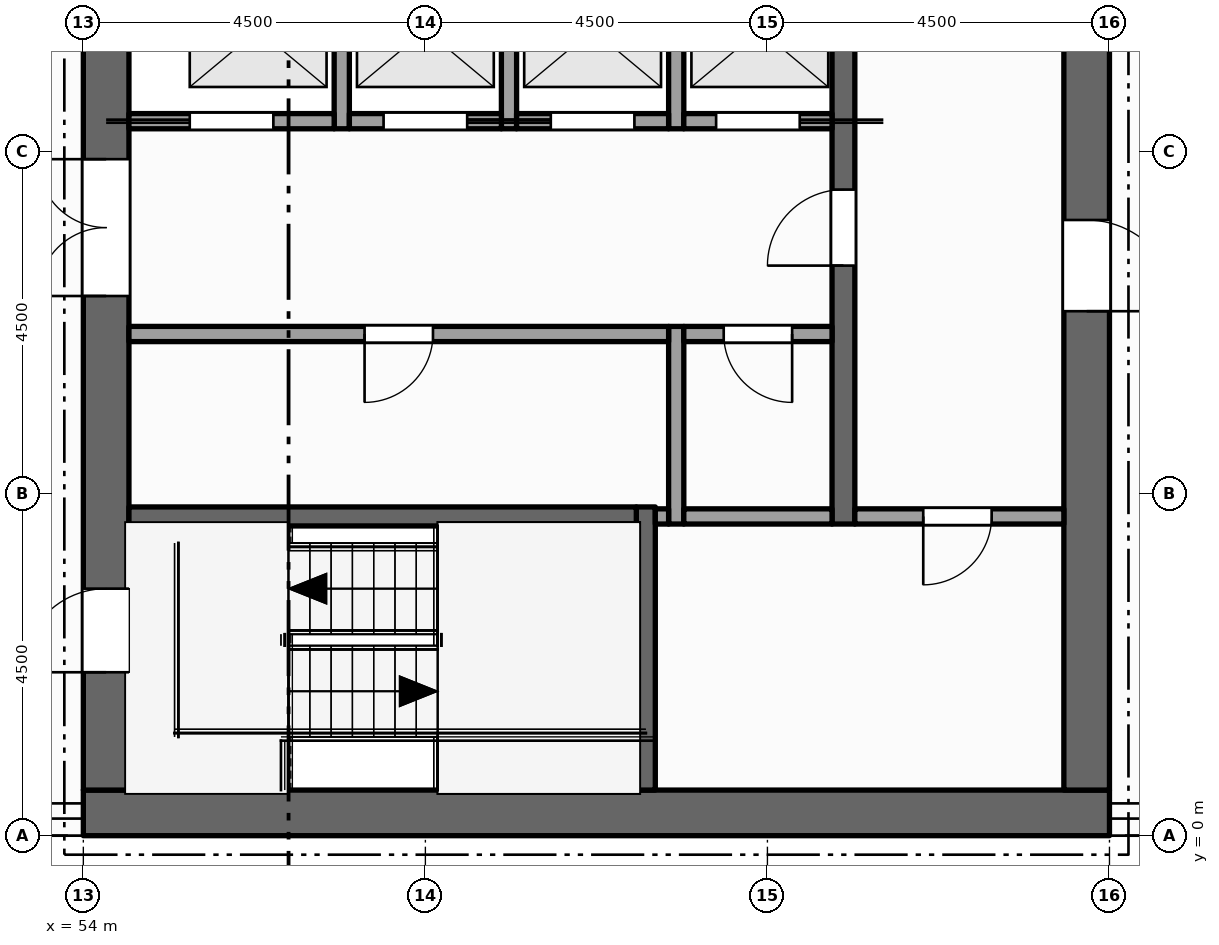
"""IFC4 building model, lengths in metres.
Left out: names, types, materials, properties, quantities, classifications, styles, units other than length and angle.
Written with IfcOpenShell. Run it as: python <this file> out.ifc"""

import sys

from ifc_helpers import new_model, si_unit, direction, frame, frame_2d, origin, place, context, subcontext, project, spatial, rectangle, extrude, element, fill, save


model = new_model("IFC4")
c1 = context("Model", 3, precision=1e-05, world=origin(), true_north=direction((0.0, 1.0)))
c2 = subcontext(c1, "Body", "Model", "MODEL_VIEW")
j1 = project(units=[si_unit("LENGTHUNIT", "METRE"), si_unit("PLANEANGLEUNIT", "RADIAN")], contexts=[c1])
p1 = place(None, origin())
s1 = spatial("IfcSite", under=j1, at=p1, CompositionType="ELEMENT")
p2 = place(p1, origin())
s2 = spatial("IfcBuilding", under=s1, at=p2, CompositionType="ELEMENT")
p3 = place(p2, frame((0.0, 0.0, 345.5)))
s3 = spatial("IfcBuildingStorey", under=s2, at=p3, CompositionType="ELEMENT", Elevation=345.5)
p4 = place(p3, frame((67.5, 0.3, -0.15), z_axis=(0.0, 0.0, 1.0), x_axis=(-1.0, 0.0, 0.0)))
e1 = element("IfcWall", 1, at=p4, inside=s3, PredefinedType="SHEAR", context=c2, shape_type="SweptSolid", body=[
    extrude(rectangle(XDim=13.5, YDim=0.6, at=frame_2d((6.75, 0.0))), origin(), (0.0, 0.0, 1.0), 5.0),
])
p5 = place(p3, frame((54.3, 0.6, -0.15), z_axis=(0.0, 0.0, 1.0), x_axis=(0.0, 1.0, 0.0)))
e2 = element("IfcWall", 2, at=p5, inside=s3, PredefinedType="SHEAR", context=c2, shape_type="SweptSolid", body=[
    extrude(rectangle(XDim=21.3, YDim=0.6, at=frame_2d((10.65, 0.0))), origin(), (0.0, 0.0, 1.0), 5.0),
])
p6 = place(p5, frame((6.5, 0.0, 0.15)))
e3 = element("IfcOpeningElement", 3, at=p6, cuts=e2, PredefinedType="OPENING", context=c2, shape_type="SweptSolid", body=[
    extrude(rectangle(XDim=1.8, YDim=2.1, at=frame_2d((0.9, 1.05))), frame((0.0, 0.31, 0.0), z_axis=(0.0, -1.0, 0.0), x_axis=(1.0, 0.0, 0.0)), (0.0, 0.0, 1.0), 0.62),
])
p7 = place(p5, frame((12.55, 0.0, 0.15)))
e4 = element("IfcOpeningElement", 4, at=p7, cuts=e2, PredefinedType="OPENING", context=c2, shape_type="SweptSolid", body=[
    extrude(rectangle(XDim=1.1, YDim=2.1, at=frame_2d((0.55, 1.05))), frame((0.0, 0.31, 0.0), z_axis=(0.0, -1.0, 0.0), x_axis=(1.0, 0.0, 0.0)), (0.0, 0.0, 1.0), 0.62),
])
p8 = place(p5, frame((1.55, 0.0, 0.15)))
e5 = element("IfcOpeningElement", 5, at=p8, cuts=e2, PredefinedType="OPENING", context=c2, shape_type="SweptSolid", body=[
    extrude(rectangle(XDim=1.1, YDim=2.1, at=frame_2d((0.55, 1.05))), frame((0.0, 0.31, 0.0), z_axis=(0.0, -1.0, 0.0), x_axis=(1.0, 0.0, 0.0)), (0.0, 0.0, 1.0), 0.62),
])
p9 = place(p5, frame((18.75, 0.0, 0.15)))
e6 = element("IfcOpeningElement", 6, at=p9, cuts=e2, PredefinedType="OPENING", context=c2, shape_type="SweptSolid", body=[
    extrude(rectangle(XDim=1.1, YDim=2.1, at=frame_2d((0.55, 1.05))), frame((0.0, 0.31, 0.0), z_axis=(0.0, -1.0, 0.0), x_axis=(1.0, 0.0, 0.0)), (0.0, 0.0, 1.0), 0.62),
])
p10 = place(p3, frame((67.2, 0.6, -0.15), z_axis=(0.0, 0.0, 1.0), x_axis=(0.0, 1.0, 0.0)))
e7 = element("IfcWall", 7, at=p10, inside=s3, PredefinedType="SHEAR", context=c2, shape_type="SweptSolid", body=[
    extrude(rectangle(XDim=21.3, YDim=0.6, at=frame_2d((10.65, 0.0))), origin(), (0.0, 0.0, 1.0), 5.0),
])
p11 = place(p10, frame((6.3, 0.0, 0.15)))
e8 = element("IfcOpeningElement", 8, at=p11, cuts=e7, PredefinedType="OPENING", context=c2, shape_type="SweptSolid", body=[
    extrude(rectangle(XDim=1.2, YDim=2.1, at=frame_2d((0.6, 1.05))), frame((0.0, 0.31, 0.0), z_axis=(0.0, -1.0, 0.0), x_axis=(1.0, 0.0, 0.0)), (0.0, 0.0, 1.0), 0.62),
])
p12 = place(p10, frame((12.8, 0.0, 0.15)))
e9 = element("IfcOpeningElement", 9, at=p12, cuts=e7, PredefinedType="OPENING", context=c2, shape_type="SweptSolid", body=[
    extrude(rectangle(XDim=1.2, YDim=2.1, at=frame_2d((0.6, 1.05))), frame((0.0, 0.31, 0.0), z_axis=(0.0, -1.0, 0.0), x_axis=(1.0, 0.0, 0.0)), (0.0, 0.0, 1.0), 0.62),
])
for number, where, z_axis, x_axis in (
    (10, (57.4, 9.3, 0.0), (0.0, 0.0, 1.0), (0.0, 1.0, 0.0)),
    (11, (59.6, 9.3, 0.0), (0.0, 0.0, 1.0), (0.0, 1.0, 0.0)),
):
    element("IfcWall", number, at=place(p3, frame(where, z_axis=z_axis, x_axis=x_axis)), inside=s3, PredefinedType="SOLIDWALL", context=c2, shape_type="SweptSolid", body=[
        extrude(rectangle(XDim=2.6, YDim=0.2, at=frame_2d((1.3, 0.0))), origin(), (0.0, 0.0, 1.0), 4.8),
    ])
p13 = place(p3, frame((61.4, 0.6, 0.0), z_axis=(0.0, 0.0, 1.0), x_axis=(0.0, 1.0, 0.0)))
e12 = element("IfcWall", 12, at=p13, inside=s3, PredefinedType="SHEAR", context=c2, shape_type="SweptSolid", body=[
    extrude(rectangle(XDim=3.725, YDim=0.25, at=frame_2d((1.862, 0.0))), origin(), (0.0, 0.0, 1.0), 4.8),
])
p14 = place(p3, frame((61.8, 4.1, 0.0), z_axis=(0.0, 0.0, 1.0), x_axis=(0.0, 1.0, 0.0)))
e13 = element("IfcWall", 13, at=p14, inside=s3, PredefinedType="PARTITIONING", context=c2, shape_type="SweptSolid", body=[
    extrude(rectangle(XDim=2.6, YDim=0.2, at=frame_2d((1.3, 0.0))), origin(), (0.0, 0.0, 1.0), 4.8),
])
p15 = place(p3, frame((61.8, 9.3, 0.0), z_axis=(0.0, 0.0, 1.0), x_axis=(0.0, 1.0, 0.0)))
e14 = element("IfcWall", 14, at=p15, inside=s3, PredefinedType="SOLIDWALL", context=c2, shape_type="SweptSolid", body=[
    extrude(rectangle(XDim=2.6, YDim=0.2, at=frame_2d((1.3, 0.0))), origin(), (0.0, 0.0, 1.0), 4.8),
])
p16 = place(p3, frame((64.0, 4.1, 0.0), z_axis=(0.0, 0.0, 1.0), x_axis=(0.0, 1.0, 0.0)))
e15 = element("IfcWall", 15, at=p16, inside=s3, PredefinedType="SHEAR", context=c2, shape_type="SweptSolid", body=[
    extrude(rectangle(XDim=14.5, YDim=0.3, at=frame_2d((7.25, 0.0))), origin(), (0.0, 0.0, 1.0), 4.8),
])
p17 = place(p16, frame((3.4, 0.0, 0.0)))
e16 = element("IfcOpeningElement", 16, at=p17, cuts=e15, PredefinedType="OPENING", context=c2, shape_type="SweptSolid", body=[
    extrude(rectangle(XDim=1.0, YDim=2.1, at=frame_2d((0.5, 1.05))), frame((0.0, 0.16, 0.0), z_axis=(0.0, -1.0, 0.0), x_axis=(1.0, 0.0, 0.0)), (0.0, 0.0, 1.0), 0.32),
])
p18 = place(p16, frame((9.1, 0.0, 0.0)))
e17 = element("IfcOpeningElement", 17, at=p18, cuts=e15, PredefinedType="OPENING", context=c2, shape_type="SweptSolid", body=[
    extrude(rectangle(XDim=1.0, YDim=2.1, at=frame_2d((0.5, 1.05))), frame((0.0, 0.16, 0.0), z_axis=(0.0, -1.0, 0.0), x_axis=(1.0, 0.0, 0.0)), (0.0, 0.0, 1.0), 0.32),
])
p19 = place(p3, frame((54.6, 4.2, 0.0), z_axis=(0.0, 0.0, 1.0), x_axis=(1.0, 0.0, 0.0)))
e18 = element("IfcWall", 18, at=p19, inside=s3, PredefinedType="SHEAR", context=c2, shape_type="SweptSolid", body=[
    extrude(rectangle(XDim=6.675, YDim=0.25, at=frame_2d((3.337, 0.0))), origin(), (0.0, 0.0, 1.0), 4.8),
])
p20 = place(p3, frame((61.525, 4.2, 0.0), z_axis=(0.0, 0.0, 1.0), x_axis=(1.0, 0.0, 0.0)))
e19 = element("IfcWall", 19, at=p20, inside=s3, PredefinedType="PARTITIONING", context=c2, shape_type="SweptSolid", body=[
    extrude(rectangle(XDim=0.175, YDim=0.2, at=frame_2d((0.087, 0.0))), origin(), (0.0, 0.0, 1.0), 4.35),
])
p21 = place(p3, frame((61.9, 4.2, 0.0), z_axis=(0.0, 0.0, 1.0), x_axis=(1.0, 0.0, 0.0)))
e20 = element("IfcWall", 20, at=p21, inside=s3, PredefinedType="PARTITIONING", context=c2, shape_type="SweptSolid", body=[
    extrude(rectangle(XDim=1.95, YDim=0.2, at=frame_2d((0.975, 0.0))), origin(), (0.0, 0.0, 1.0), 4.35),
])
p22 = place(p3, frame((64.15, 4.2, 0.0), z_axis=(0.0, 0.0, 1.0), x_axis=(1.0, 0.0, 0.0)))
e21 = element("IfcWall", 21, at=p22, inside=s3, PredefinedType="PARTITIONING", context=c2, shape_type="SweptSolid", body=[
    extrude(rectangle(XDim=2.75, YDim=0.2, at=frame_2d((1.375, 0.0))), origin(), (0.0, 0.0, 1.0), 4.35),
])
p23 = place(p22, frame((0.9, 0.0, 0.0)))
e22 = element("IfcOpeningElement", 22, at=p23, cuts=e21, PredefinedType="OPENING", context=c2, shape_type="SweptSolid", body=[
    extrude(rectangle(XDim=0.9, YDim=2.1, at=frame_2d((0.45, 1.05))), frame((0.0, 0.11, 0.0), z_axis=(0.0, -1.0, 0.0), x_axis=(1.0, 0.0, 0.0)), (0.0, 0.0, 1.0), 0.22),
])
p24 = place(p3, frame((54.6, 6.6, 0.0), z_axis=(0.0, 0.0, 1.0), x_axis=(1.0, 0.0, 0.0)))
e23 = element("IfcWall", 23, at=p24, inside=s3, PredefinedType="PARTITIONING", context=c2, shape_type="SweptSolid", body=[
    extrude(rectangle(XDim=7.1, YDim=0.2, at=frame_2d((3.55, 0.0))), origin(), (0.0, 0.0, 1.0), 4.8),
])
p25 = place(p24, frame((3.1, 0.0, 0.0)))
e24 = element("IfcOpeningElement", 24, at=p25, cuts=e23, PredefinedType="OPENING", context=c2, shape_type="SweptSolid", body=[
    extrude(rectangle(XDim=0.9, YDim=2.1, at=frame_2d((0.45, 1.05))), frame((0.0, 0.11, 0.0), z_axis=(0.0, -1.0, 0.0), x_axis=(1.0, 0.0, 0.0)), (0.0, 0.0, 1.0), 0.22),
])
p26 = place(p3, frame((61.9, 6.6, 0.0), z_axis=(0.0, 0.0, 1.0), x_axis=(1.0, 0.0, 0.0)))
e25 = element("IfcWall", 25, at=p26, inside=s3, PredefinedType="PARTITIONING", context=c2, shape_type="SweptSolid", body=[
    extrude(rectangle(XDim=1.95, YDim=0.2, at=frame_2d((0.975, 0.0))), origin(), (0.0, 0.0, 1.0), 4.8),
])
p27 = place(p26, frame((0.525, 0.0, 0.0)))
e26 = element("IfcOpeningElement", 26, at=p27, cuts=e25, PredefinedType="OPENING", context=c2, shape_type="SweptSolid", body=[
    extrude(rectangle(XDim=0.9, YDim=2.1, at=frame_2d((0.45, 1.05))), frame((0.0, 0.11, 0.0), z_axis=(0.0, -1.0, 0.0), x_axis=(1.0, 0.0, 0.0)), (0.0, 0.0, 1.0), 0.22),
])
p28 = place(p3, frame((54.6, 9.4, 0.0), z_axis=(0.0, 0.0, 1.0), x_axis=(1.0, 0.0, 0.0)))
e27 = element("IfcWall", 27, at=p28, inside=s3, PredefinedType="SOLIDWALL", context=c2, shape_type="SweptSolid", body=[
    extrude(rectangle(XDim=2.7, YDim=0.2, at=frame_2d((1.35, 0.0))), origin(), (0.0, 0.0, 1.0), 4.8),
])
p29 = place(p28, frame((0.8, 0.0, 0.012)))
e28 = element("IfcOpeningElement", 28, at=p29, cuts=e27, PredefinedType="OPENING", context=c2, shape_type="SweptSolid", body=[
    extrude(rectangle(XDim=1.1, YDim=2.1, at=frame_2d((0.55, 1.05))), frame((0.0, 0.11, 0.0), z_axis=(0.0, -1.0, 0.0), x_axis=(1.0, 0.0, 0.0)), (0.0, 0.0, 1.0), 0.22),
])
p30 = place(p3, frame((57.5, 9.4, 0.0), z_axis=(0.0, 0.0, 1.0), x_axis=(1.0, 0.0, 0.0)))
e29 = element("IfcWall", 29, at=p30, inside=s3, PredefinedType="SOLIDWALL", context=c2, shape_type="SweptSolid", body=[
    extrude(rectangle(XDim=2.0, YDim=0.2, at=frame_2d((1.0, 0.0))), origin(), (0.0, 0.0, 1.0), 4.8),
])
p31 = place(p30, frame((0.45, 0.0, 0.012)))
e30 = element("IfcOpeningElement", 30, at=p31, cuts=e29, PredefinedType="OPENING", context=c2, shape_type="SweptSolid", body=[
    extrude(rectangle(XDim=1.1, YDim=2.1, at=frame_2d((0.55, 1.05))), frame((0.0, 0.11, 0.0), z_axis=(0.0, -1.0, 0.0), x_axis=(1.0, 0.0, 0.0)), (0.0, 0.0, 1.0), 0.22),
])
p32 = place(p3, frame((59.7, 9.4, 0.0), z_axis=(0.0, 0.0, 1.0), x_axis=(1.0, 0.0, 0.0)))
e31 = element("IfcWall", 31, at=p32, inside=s3, PredefinedType="SOLIDWALL", context=c2, shape_type="SweptSolid", body=[
    extrude(rectangle(XDim=2.0, YDim=0.2, at=frame_2d((1.0, 0.0))), origin(), (0.0, 0.0, 1.0), 4.8),
])
p33 = place(p32, frame((0.45, 0.0, 0.012)))
e32 = element("IfcOpeningElement", 32, at=p33, cuts=e31, PredefinedType="OPENING", context=c2, shape_type="SweptSolid", body=[
    extrude(rectangle(XDim=1.1, YDim=2.1, at=frame_2d((0.55, 1.05))), frame((0.0, 0.11, 0.0), z_axis=(0.0, -1.0, 0.0), x_axis=(1.0, 0.0, 0.0)), (0.0, 0.0, 1.0), 0.22),
])
p34 = place(p3, frame((61.9, 9.4, 0.0), z_axis=(0.0, 0.0, 1.0), x_axis=(1.0, 0.0, 0.0)))
e33 = element("IfcWall", 33, at=p34, inside=s3, PredefinedType="SOLIDWALL", context=c2, shape_type="SweptSolid", body=[
    extrude(rectangle(XDim=1.95, YDim=0.2, at=frame_2d((0.975, 0.0))), origin(), (0.0, 0.0, 1.0), 4.8),
])
p35 = place(p34, frame((0.425, 0.0, 0.012)))
e34 = element("IfcOpeningElement", 34, at=p35, cuts=e33, PredefinedType="OPENING", context=c2, shape_type="SweptSolid", body=[
    extrude(rectangle(XDim=1.1, YDim=2.1, at=frame_2d((0.55, 1.05))), frame((0.0, 0.11, 0.0), z_axis=(0.0, -1.0, 0.0), x_axis=(1.0, 0.0, 0.0)), (0.0, 0.0, 1.0), 0.22),
])
p36 = place(p29, origin())
e35 = element("IfcDoor", 35, at=p36, inside=s3, OperationType="SLIDING_TO_LEFT", PredefinedType="DOOR", context=c2, shape_type="SweptSolid", body=[
    extrude(rectangle(XDim=1.1, YDim=2.1, at=frame_2d((0.55, 1.05))), frame((0.0, 0.025, 0.0), z_axis=(0.0, -1.0, 0.0), x_axis=(1.0, 0.0, 0.0)), (0.0, 0.0, 1.0), 0.05),
])
fill(e28, e35)
p37 = place(p31, origin())
e36 = element("IfcDoor", 36, at=p37, inside=s3, OperationType="SLIDING_TO_RIGHT", PredefinedType="DOOR", context=c2, shape_type="SweptSolid", body=[
    extrude(rectangle(XDim=1.1, YDim=2.1, at=frame_2d((0.55, 1.05))), frame((0.0, 0.025, 0.0), z_axis=(0.0, -1.0, 0.0), x_axis=(1.0, 0.0, 0.0)), (0.0, 0.0, 1.0), 0.05),
])
fill(e30, e36)
p38 = place(p33, origin())
e37 = element("IfcDoor", 37, at=p38, inside=s3, OperationType="SLIDING_TO_LEFT", PredefinedType="DOOR", context=c2, shape_type="SweptSolid", body=[
    extrude(rectangle(XDim=1.1, YDim=2.1, at=frame_2d((0.55, 1.05))), frame((0.0, 0.025, 0.0), z_axis=(0.0, -1.0, 0.0), x_axis=(1.0, 0.0, 0.0)), (0.0, 0.0, 1.0), 0.05),
])
fill(e32, e37)
p39 = place(p35, origin())
e38 = element("IfcDoor", 38, at=p39, inside=s3, OperationType="SLIDING_TO_RIGHT", PredefinedType="DOOR", context=c2, shape_type="SweptSolid", body=[
    extrude(rectangle(XDim=1.1, YDim=2.1, at=frame_2d((0.55, 1.05))), frame((0.0, 0.025, 0.0), z_axis=(0.0, -1.0, 0.0), x_axis=(1.0, 0.0, 0.0)), (0.0, 0.0, 1.0), 0.05),
])
fill(e34, e38)
p40 = place(p6, origin())
e39 = element("IfcDoor", 39, at=p40, inside=s3, OperationType="DOUBLE_DOOR_SINGLE_SWING", PredefinedType="DOOR", context=c2, shape_type="SweptSolid", body=[
    extrude(rectangle(XDim=1.8, YDim=2.1, at=frame_2d((0.9, 1.05))), frame((0.0, 0.025, 0.0), z_axis=(0.0, -1.0, 0.0), x_axis=(1.0, 0.0, 0.0)), (0.0, 0.0, 1.0), 0.05),
])
fill(e3, e39)
p41 = place(p17, origin())
e40 = element("IfcDoor", 40, at=p41, inside=s3, OperationType="SINGLE_SWING_LEFT", PredefinedType="DOOR", context=c2, shape_type="SweptSolid", body=[
    extrude(rectangle(XDim=1.0, YDim=2.1, at=frame_2d((0.5, 1.05))), frame((0.0, 0.025, 0.0), z_axis=(0.0, -1.0, 0.0), x_axis=(1.0, 0.0, 0.0)), (0.0, 0.0, 1.0), 0.05),
])
fill(e16, e40)
p42 = place(p8, origin())
e41 = element("IfcDoor", 41, at=p42, inside=s3, OperationType="SINGLE_SWING_LEFT", PredefinedType="DOOR", context=c2, shape_type="SweptSolid", body=[
    extrude(rectangle(XDim=1.1, YDim=2.1, at=frame_2d((0.55, 1.05))), frame((0.0, 0.025, 0.0), z_axis=(0.0, -1.0, 0.0), x_axis=(1.0, 0.0, 0.0)), (0.0, 0.0, 1.0), 0.05),
])
fill(e5, e41)
p43 = place(p23, origin())
e42 = element("IfcDoor", 42, at=p43, inside=s3, OperationType="SINGLE_SWING_LEFT", PredefinedType="DOOR", context=c2, shape_type="SweptSolid", body=[
    extrude(rectangle(XDim=0.9, YDim=2.1, at=frame_2d((0.45, 1.05))), frame((0.0, 0.025, 0.0), z_axis=(0.0, -1.0, 0.0), x_axis=(1.0, 0.0, 0.0)), (0.0, 0.0, 1.0), 0.05),
])
fill(e22, e42)
p44 = place(p25, origin())
e43 = element("IfcDoor", 43, at=p44, inside=s3, OperationType="SINGLE_SWING_LEFT", PredefinedType="DOOR", context=c2, shape_type="SweptSolid", body=[
    extrude(rectangle(XDim=0.9, YDim=2.1, at=frame_2d((0.45, 1.05))), frame((0.0, 0.025, 0.0), z_axis=(0.0, -1.0, 0.0), x_axis=(1.0, 0.0, 0.0)), (0.0, 0.0, 1.0), 0.05),
])
fill(e24, e43)
p45 = place(p27, origin())
e44 = element("IfcDoor", 44, at=p45, inside=s3, OperationType="SINGLE_SWING_RIGHT", PredefinedType="DOOR", context=c2, shape_type="SweptSolid", body=[
    extrude(rectangle(XDim=0.9, YDim=2.1, at=frame_2d((0.45, 1.05))), frame((0.0, 0.025, 0.0), z_axis=(0.0, -1.0, 0.0), x_axis=(1.0, 0.0, 0.0)), (0.0, 0.0, 1.0), 0.05),
])
fill(e26, e44)
p46 = place(p11, origin())
e45 = element("IfcDoor", 45, at=p46, inside=s3, OperationType="SINGLE_SWING_LEFT", PredefinedType="DOOR", context=c2, shape_type="SweptSolid", body=[
    extrude(rectangle(XDim=1.2, YDim=2.1, at=frame_2d((0.6, 1.05))), frame((0.0, 0.025, 0.0), z_axis=(0.0, -1.0, 0.0), x_axis=(1.0, 0.0, 0.0)), (0.0, 0.0, 1.0), 0.05),
])
fill(e8, e45)
save(model, sys.argv[1])
